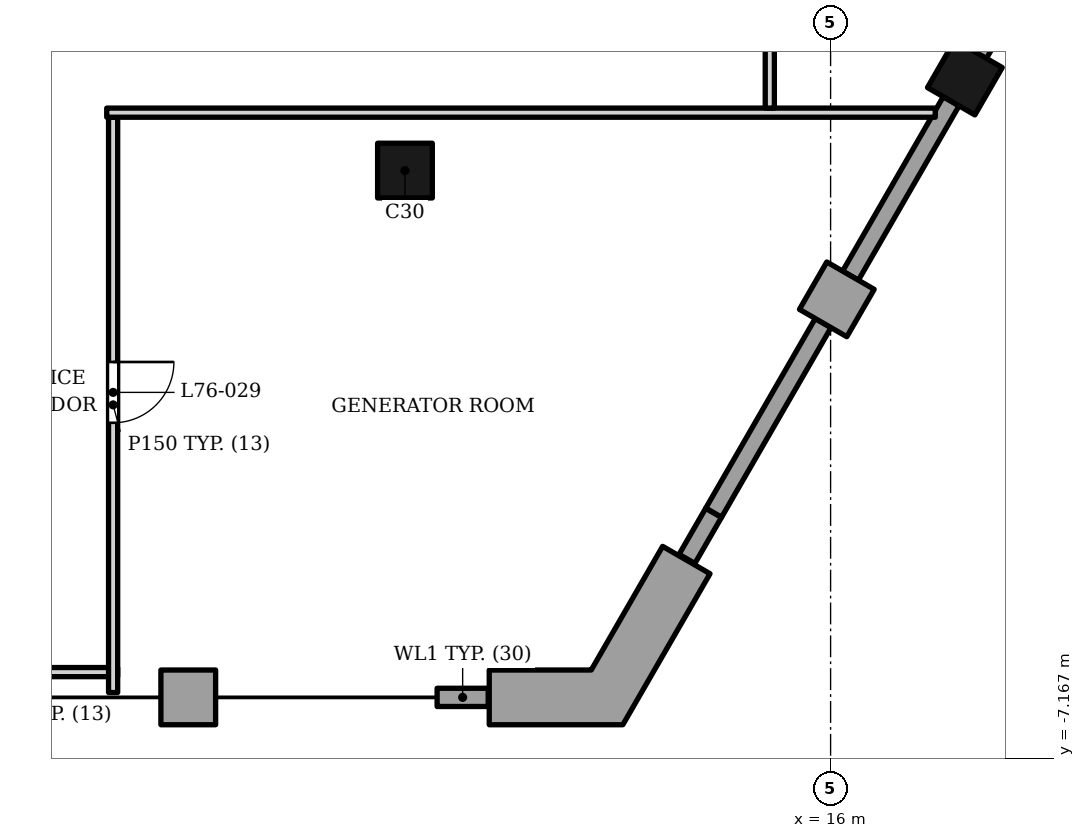
"""IFC4 building model, lengths in metres.
Left out: names, types, materials, properties, quantities, classifications, styles, units other than length and angle.
Written with IfcOpenShell. Run it as: python <this file> out.ifc"""

import sys

from ifc_helpers import new_model, si_unit, direction, frame, frame_2d, origin, origin_2d, place, context, subcontext, project, spatial, polyline, rectangle, outline, extrude, element, fill, save


model = new_model("IFC4")
c1 = context("Model", 3, precision=1e-05, world=origin(), true_north=direction((0.0, 1.0)))
c2 = subcontext(c1, "Body", "Model", "MODEL_VIEW")
j1 = project(units=[si_unit("LENGTHUNIT", "METRE"), si_unit("PLANEANGLEUNIT", "RADIAN")], contexts=[c1])
p1 = place(None, origin())
s1 = spatial("IfcSite", under=j1, at=p1, CompositionType="ELEMENT")
p2 = place(p1, origin())
s2 = spatial("IfcBuilding", under=s1, at=p2, CompositionType="ELEMENT")
p3 = place(p2, frame((0.0, 0.0, 325.5)))
s3 = spatial("IfcBuildingStorey", under=s2, at=p3, CompositionType="ELEMENT", Elevation=325.5)
for number, where, z_axis, x_axis in (
    (1, (9.0, 2.5, 0.0), (0.0, 0.0, 1.0), (1.0, 0.0, 0.0)),
    (2, (18.208, 4.03, 0.0), (0.0, 0.0, 1.0), (0.5, 0.866, 0.0)),
):
    element("IfcColumn", number, at=place(p3, frame(where, z_axis=z_axis, x_axis=x_axis)), inside=s3, PredefinedType="COLUMN", context=c2, shape_type="SweptSolid", body=[
        extrude(rectangle(XDim=0.9, YDim=0.9, at=origin_2d()), origin(), (0.0, 0.0, 1.0), 5.0),
    ])
p4 = place(p3, origin())
e3 = element("IfcWall", 3, at=p4, inside=s3, PredefinedType="SOLIDWALL", context=c2, shape_type="SweptSolid", body=[
    extrude(outline(polyline([(5.886, -5.713), (4.986, -5.713), (4.986, -6.613), (5.886, -6.613), (5.886, -5.713)])), origin(), (0.0, 0.0, 1.0), 3.297),
])
p5 = place(p3, frame((16.492, 0.157, 0.0), z_axis=(0.0, 0.0, 1.0), x_axis=(-0.866013897511, 0.50001992892, 0.0)))
e4 = element("IfcWall", 4, at=p5, inside=s3, PredefinedType="SOLIDWALL", context=c2, shape_type="SweptSolid", body=[
    extrude(rectangle(XDim=0.9, YDim=0.9, at=frame_2d((0.45, 0.0))), origin(), (0.0, 0.0, 1.0), 3.8),
])
p6 = place(p3, frame((14.077, -3.125, 0.0), z_axis=(0.0, 0.0, 1.0), x_axis=(0.499961193289, 0.866047807691, 0.0)))
e5 = element("IfcWall", 5, at=p6, inside=s3, PredefinedType="ELEMENTEDWALL", context=c2, shape_type="SweptSolid", body=[
    extrude(rectangle(XDim=3.6, YDim=0.3, at=frame_2d((1.8, 0.0))), origin(), (0.0, 0.0, 1.0), 3.8),
])
p7 = place(p3, origin())
e6 = element("IfcWall", 6, at=p7, inside=s3, PredefinedType="ELEMENTEDWALL", context=c2, shape_type="SweptSolid", body=[
    extrude(outline(polyline([(16.457, 0.697), (18.113, 3.565), (17.853, 3.715), (16.198, 0.847), (16.457, 0.697)])), origin(), (0.0, 0.0, 1.0), 3.8),
])
p8 = place(p3, origin())
e7 = element("IfcWall", 7, at=p8, inside=s3, PredefinedType="SOLIDWALL", context=c2, shape_type="SweptSolid", body=[
    extrude(outline(polyline([(10.386, -5.713), (10.386, -6.613), (12.583, -6.613), (14.017, -4.129), (13.238, -3.679), (12.063, -5.713), (10.386, -5.713)])), origin(), (0.0, 0.0, 1.0), 3.297),
])
p9 = place(p3, origin())
e8 = element("IfcWall", 8, at=p9, inside=s3, PredefinedType="SOLIDWALL", context=c2, shape_type="SweptSolid", body=[
    extrude(outline(polyline([(18.188, 4.894), (18.967, 4.444), (20.247, 6.661), (21.059, 7.549), (20.395, 8.156), (19.516, 7.196), (18.188, 4.894)])), origin(), (0.0, 0.0, 1.0), 3.8),
])
p10 = place(p3, frame((9.529, -6.163, 0.0), z_axis=(0.0, 0.0, 1.0), x_axis=(1.0, 0.0, 0.0)))
e9 = element("IfcWall", 9, at=p10, inside=s3, PredefinedType="ELEMENTEDWALL", context=c2, shape_type="SweptSolid", body=[
    extrude(rectangle(XDim=0.84, YDim=0.3, at=frame_2d((0.42, 0.0))), origin(), (0.0, 0.0, 1.0), 3.279),
])
p11 = place(p3, frame((13.638, -3.885, 0.0), z_axis=(0.0, 0.0, 1.0), x_axis=(0.499923923456, 0.866069322143, 0.0)))
e10 = element("IfcWall", 10, at=p11, inside=s3, PredefinedType="ELEMENTEDWALL", context=c2, shape_type="SweptSolid", body=[
    extrude(rectangle(XDim=0.874, YDim=0.3, at=frame_2d((0.437, 0.0))), origin(), (0.0, 0.0, 1.0), 3.8),
])
p12 = place(p3, frame((18.413, 4.385, 0.0), z_axis=(0.0, 0.0, 1.0), x_axis=(0.500026652407, 0.866010015463, 0.0)))
e11 = element("IfcWall", 11, at=p12, inside=s3, PredefinedType="ELEMENTEDWALL", context=c2, shape_type="SweptSolid", body=[
    extrude(rectangle(XDim=0.324, YDim=0.3, at=frame_2d((0.162, 0.0))), origin(), (0.0, 0.0, 1.0), 3.8),
])
p13 = place(p3, frame((1.725, -5.747, 0.0), z_axis=(0.0, 0.0, 1.0), x_axis=(1.0, 0.0, 0.0)))
e12 = element("IfcWall", 12, at=p13, inside=s3, PredefinedType="PARTITIONING", context=c2, shape_type="SweptSolid", body=[
    extrude(rectangle(XDim=2.55, YDim=0.15, at=frame_2d((1.275, 0.0))), origin(), (0.0, 0.0, 1.0), 3.961),
])
p14 = place(p3, frame((4.2, -6.083, 0.0), z_axis=(0.0, 0.0, 1.0), x_axis=(0.0, 1.0, 0.0)))
e13 = element("IfcWall", 13, at=p14, inside=s3, PredefinedType="PARTITIONING", context=c2, shape_type="SweptSolid", body=[
    extrude(outline(polyline([(0.0, 0.0), (9.461, 0.0), (9.461, 4.8), (1.261, 4.8), (0.0, 3.742), (0.0, 0.0)])), frame((0.0, 0.075, 0.0), z_axis=(0.0, -1.0, 0.0), x_axis=(1.0, 0.0, 0.0)), (0.0, 0.0, 1.0), 0.15),
])
p15 = place(p14, frame((4.436, 0.0, 0.0)))
e14 = element("IfcOpeningElement", 14, at=p15, cuts=e13, PredefinedType="OPENING", context=c2, shape_type="SweptSolid", body=[
    extrude(rectangle(XDim=1.0, YDim=2.1, at=frame_2d((0.5, 1.05))), frame((0.0, 0.085, 0.0), z_axis=(0.0, -1.0, 0.0), x_axis=(1.0, 0.0, 0.0)), (0.0, 0.0, 1.0), 0.17),
])
p16 = place(p3, frame((4.095, 3.453, 0.0), z_axis=(0.0, 0.0, 1.0), x_axis=(1.0, 0.0, 0.0)))
e15 = element("IfcWall", 15, at=p16, inside=s3, PredefinedType="PARTITIONING", context=c2, shape_type="SweptSolid", body=[
    extrude(rectangle(XDim=13.627, YDim=0.15, at=frame_2d((6.813, 0.0))), origin(), (0.0, 0.0, 1.0), 4.402),
])
p17 = place(p3, frame((15.0, 3.528, 0.0), z_axis=(0.0, 0.0, 1.0), x_axis=(0.0, 1.0, 0.0)))
e16 = element("IfcWall", 16, at=p17, inside=s3, PredefinedType="PARTITIONING", context=c2, shape_type="SweptSolid", body=[
    extrude(rectangle(XDim=9.956, YDim=0.15, at=frame_2d((4.978, 0.0))), origin(), (0.0, 0.0, 1.0), 4.02),
])
p18 = place(p17, frame((4.431, 0.0, 0.0)))
e17 = element("IfcOpeningElement", 17, at=p18, cuts=e16, PredefinedType="OPENING", context=c2, shape_type="SweptSolid", body=[
    extrude(rectangle(XDim=1.0, YDim=2.1, at=frame_2d((0.5, 1.05))), frame((0.0, 0.085, 0.0), z_axis=(0.0, -1.0, 0.0), x_axis=(1.0, 0.0, 0.0)), (0.0, 0.0, 1.0), 0.17),
])
p19 = place(p15, origin())
e18 = element("IfcDoor", 18, at=p19, inside=s3, OperationType="SINGLE_SWING_RIGHT", PredefinedType="DOOR", context=c2, shape_type="SweptSolid", body=[
    extrude(rectangle(XDim=1.0, YDim=2.1, at=frame_2d((0.5, 1.05))), frame((0.0, 0.025, 0.0), z_axis=(0.0, -1.0, 0.0), x_axis=(1.0, 0.0, 0.0)), (0.0, 0.0, 1.0), 0.05),
])
fill(e14, e18)
save(model, sys.argv[1])
